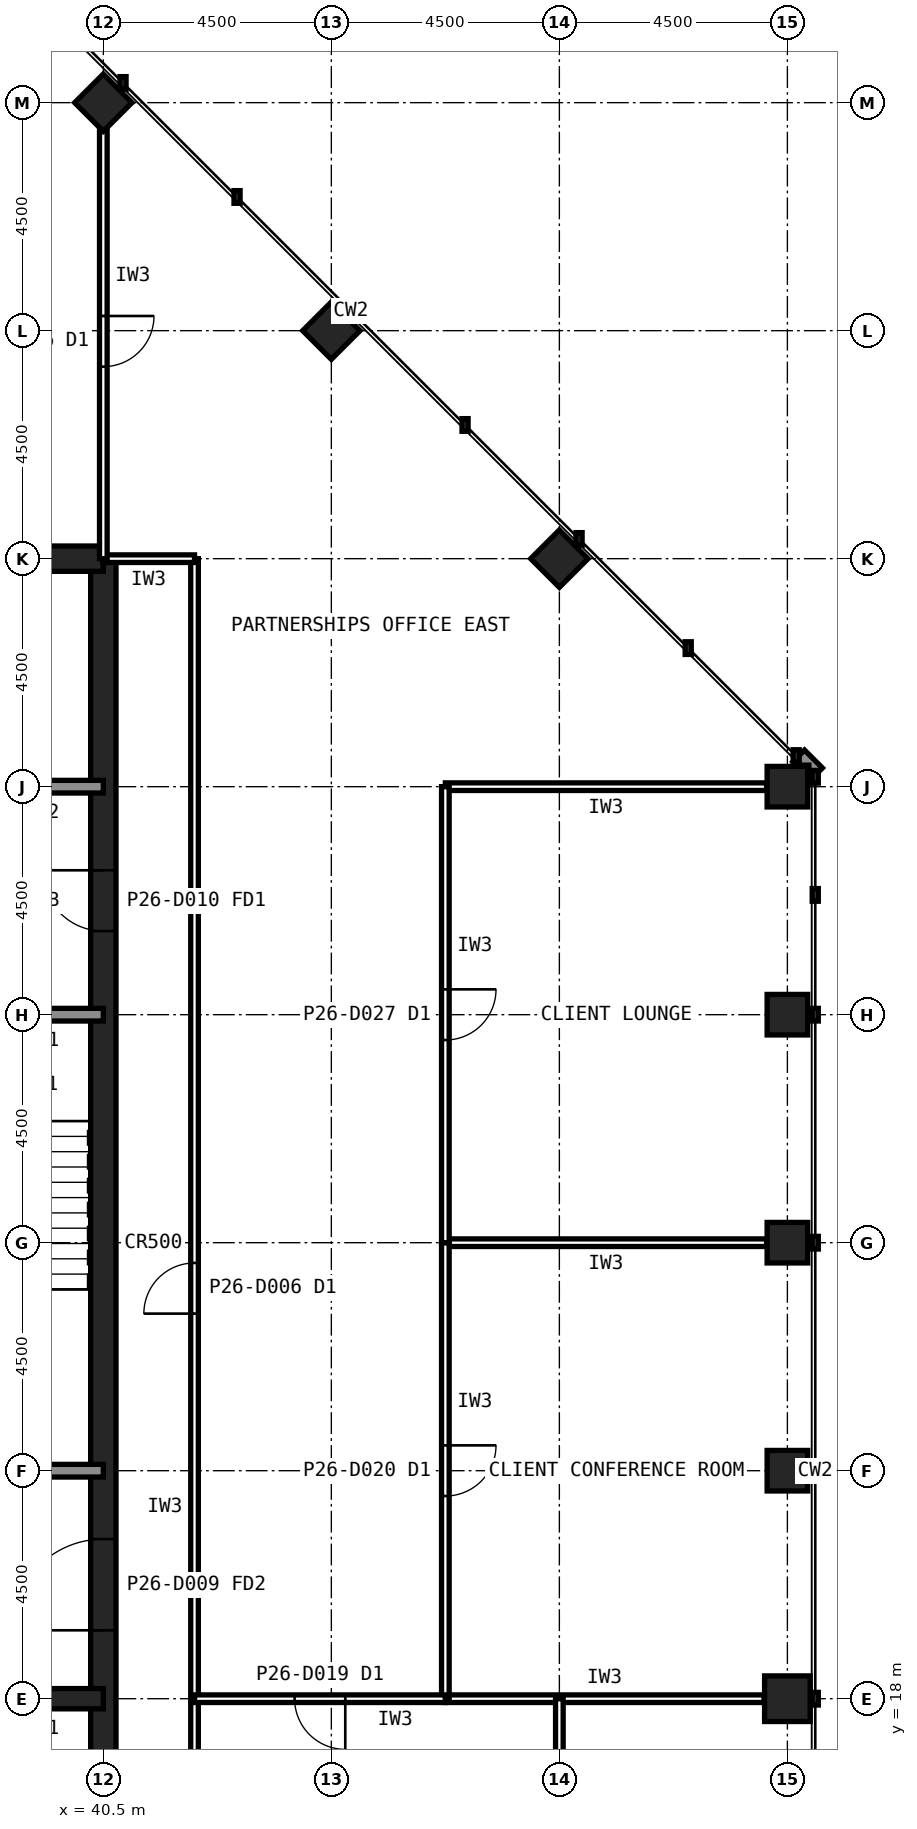
"""IFC4 building model, lengths in metres.
Left out: names, types, materials, properties, quantities, classifications, styles, units other than length and angle.
Written with IfcOpenShell. Run it as: python <this file> out.ifc"""

import sys

from ifc_helpers import new_model, si_unit, direction, frame, frame_2d, origin, origin_2d, place, context, subcontext, project, spatial, rectangle, hollow_rectangle, extrude, element, fill, save


model = new_model("IFC4")
c1 = context("Model", 3, precision=1e-05, world=origin(), true_north=direction((0.0, 1.0)))
c2 = subcontext(c1, "Body", "Model", "MODEL_VIEW")
j1 = project(units=[si_unit("LENGTHUNIT", "METRE"), si_unit("PLANEANGLEUNIT", "RADIAN")], contexts=[c1])
p1 = place(None, origin())
s1 = spatial("IfcSite", under=j1, at=p1, CompositionType="ELEMENT")
p2 = place(p1, origin())
s2 = spatial("IfcBuilding", under=s1, at=p2, CompositionType="ELEMENT")
p3 = place(p2, frame((0.0, 0.0, 115.6)))
s3 = spatial("IfcBuildingStorey", under=s2, at=p3, CompositionType="ELEMENT", Elevation=115.6)
p4 = place(p3, frame((54.0, 18.0, 0.0), z_axis=(0.0, 0.0, 1.0), x_axis=(1.0, 0.0, 0.0)))
e1 = element("IfcColumn", 1, at=p4, inside=s3, PredefinedType="COLUMN", context=c2, shape_type="SweptSolid", body=[
    extrude(hollow_rectangle(XDim=0.9, YDim=0.9, WallThickness=0.063, at=origin_2d()), origin(), (0.0, 0.0, 1.0), 4.0),
])
for number, where, z_axis, x_axis in (
    (2, (54.0, 22.5, 0.0), (0.0, 0.0, 1.0), (1.0, 0.0, 0.0)),
    (3, (54.0, 27.0, 0.0), (0.0, 0.0, 1.0), (1.0, 0.0, 0.0)),
    (4, (54.0, 31.5, 0.0), (0.0, 0.0, 1.0), (1.0, 0.0, 0.0)),
    (5, (54.0, 36.0, 0.0), (0.0, 0.0, 1.0), (1.0, 0.0, 0.0)),
    (6, (49.5, 40.5, 0.0), (0.0, 0.0, 1.0), (0.707, 0.707, 0.0)),
    (7, (45.0, 45.0, 0.0), (0.0, 0.0, 1.0), (0.707, 0.707, 0.0)),
    (8, (40.5, 49.5, 0.0), (0.0, 0.0, 1.0), (0.707, 0.707, 0.0)),
):
    element("IfcColumn", number, at=place(p3, frame(where, z_axis=z_axis, x_axis=x_axis)), inside=s3, PredefinedType="COLUMN", context=c2, shape_type="SweptSolid", body=[
        extrude(hollow_rectangle(XDim=0.8, YDim=0.8, WallThickness=0.045, at=origin_2d()), origin(), (0.0, 0.0, 1.0), 4.0),
    ])
p5 = place(p3, frame((40.5, 13.5, 0.0), z_axis=(0.0, 0.0, 1.0), x_axis=(0.0, 1.0, 0.0)))
e9 = element("IfcWall", 9, at=p5, inside=s3, PredefinedType="SHEAR", context=c2, shape_type="SweptSolid", body=[
    extrude(rectangle(XDim=27.0, YDim=0.5, at=frame_2d((13.5, 0.0))), origin(), (0.0, 0.0, 1.0), 4.0),
])
p6 = place(p5, frame((5.85, 0.0, 0.0)))
e10 = element("IfcOpeningElement", 10, at=p6, cuts=e9, PredefinedType="OPENING", context=c2, shape_type="SweptSolid", body=[
    extrude(rectangle(XDim=1.8, YDim=2.1, at=frame_2d((0.9, 1.05))), frame((0.0, 0.26, 0.0), z_axis=(0.0, -1.0, 0.0), x_axis=(1.0, 0.0, 0.0)), (0.0, 0.0, 1.0), 0.52),
])
p7 = place(p5, frame((19.65, 0.0, 0.0)))
e11 = element("IfcOpeningElement", 11, at=p7, cuts=e9, PredefinedType="OPENING", context=c2, shape_type="SweptSolid", body=[
    extrude(rectangle(XDim=1.2, YDim=2.1, at=frame_2d((0.6, 1.05))), frame((0.0, 0.26, 0.0), z_axis=(0.0, -1.0, 0.0), x_axis=(1.0, 0.0, 0.0)), (0.0, 0.0, 1.0), 0.52),
])
p8 = place(p3, frame((40.5, 40.5, 0.0), z_axis=(0.0, 0.0, 1.0), x_axis=(-1.0, 0.0, 0.0)))
e12 = element("IfcWall", 12, at=p8, inside=s3, PredefinedType="SHEAR", context=c2, shape_type="SweptSolid", body=[
    extrude(rectangle(XDim=27.0, YDim=0.5, at=frame_2d((13.5, 0.0))), origin(), (0.0, 0.0, 1.0), 4.0),
])
p9 = place(p3, frame((13.5, 18.0, 0.0), z_axis=(0.0, 0.0, 1.0), x_axis=(1.0, 0.0, 0.0)))
e13 = element("IfcWall", 13, at=p9, inside=s3, PredefinedType="SHEAR", context=c2, shape_type="SweptSolid", body=[
    extrude(rectangle(XDim=27.0, YDim=0.4, at=frame_2d((13.5, 0.0))), origin(), (0.0, 0.0, 1.0), 4.0),
])
p10 = place(p9, frame((24.3, 0.0, 0.0)))
e14 = element("IfcOpeningElement", 14, at=p10, cuts=e13, PredefinedType="OPENING", context=c2, shape_type="SweptSolid", body=[
    extrude(rectangle(XDim=0.9, YDim=2.1, at=frame_2d((0.45, 1.05))), frame((0.0, 0.21, 0.0), z_axis=(0.0, -1.0, 0.0), x_axis=(1.0, 0.0, 0.0)), (0.0, 0.0, 1.0), 0.42),
])
p11 = place(p9, frame((5.45, 0.0, 0.0)))
e15 = element("IfcOpeningElement", 15, at=p11, cuts=e13, PredefinedType="OPENING", context=c2, shape_type="SweptSolid", body=[
    extrude(rectangle(XDim=1.1, YDim=2.1, at=frame_2d((0.55, 1.05))), frame((0.0, 0.21, 0.0), z_axis=(0.0, -1.0, 0.0), x_axis=(1.0, 0.0, 0.0)), (0.0, 0.0, 1.0), 0.42),
])
p12 = place(p9, frame((8.45, 0.0, 0.0)))
e16 = element("IfcOpeningElement", 16, at=p12, cuts=e13, PredefinedType="OPENING", context=c2, shape_type="SweptSolid", body=[
    extrude(rectangle(XDim=1.1, YDim=2.1, at=frame_2d((0.55, 1.05))), frame((0.0, 0.21, 0.0), z_axis=(0.0, -1.0, 0.0), x_axis=(1.0, 0.0, 0.0)), (0.0, 0.0, 1.0), 0.42),
])
p13 = place(p9, frame((11.45, 0.0, 0.0)))
e17 = element("IfcOpeningElement", 17, at=p13, cuts=e13, PredefinedType="OPENING", context=c2, shape_type="SweptSolid", body=[
    extrude(rectangle(XDim=1.1, YDim=2.1, at=frame_2d((0.55, 1.05))), frame((0.0, 0.21, 0.0), z_axis=(0.0, -1.0, 0.0), x_axis=(1.0, 0.0, 0.0)), (0.0, 0.0, 1.0), 0.42),
])
p14 = place(p9, frame((14.45, 0.0, 0.0)))
e18 = element("IfcOpeningElement", 18, at=p14, cuts=e13, PredefinedType="OPENING", context=c2, shape_type="SweptSolid", body=[
    extrude(rectangle(XDim=1.1, YDim=2.1, at=frame_2d((0.55, 1.05))), frame((0.0, 0.21, 0.0), z_axis=(0.0, -1.0, 0.0), x_axis=(1.0, 0.0, 0.0)), (0.0, 0.0, 1.0), 0.42),
])
p15 = place(p9, frame((17.45, 0.0, 0.0)))
e19 = element("IfcOpeningElement", 19, at=p15, cuts=e13, PredefinedType="OPENING", context=c2, shape_type="SweptSolid", body=[
    extrude(rectangle(XDim=1.1, YDim=2.1, at=frame_2d((0.55, 1.05))), frame((0.0, 0.21, 0.0), z_axis=(0.0, -1.0, 0.0), x_axis=(1.0, 0.0, 0.0)), (0.0, 0.0, 1.0), 0.42),
])
p16 = place(p9, frame((20.45, 0.0, 0.0)))
e20 = element("IfcOpeningElement", 20, at=p16, cuts=e13, PredefinedType="OPENING", context=c2, shape_type="SweptSolid", body=[
    extrude(rectangle(XDim=1.1, YDim=2.1, at=frame_2d((0.55, 1.05))), frame((0.0, 0.21, 0.0), z_axis=(0.0, -1.0, 0.0), x_axis=(1.0, 0.0, 0.0)), (0.0, 0.0, 1.0), 0.42),
])
p17 = place(p9, frame((1.6, 0.0, 0.0)))
e21 = element("IfcOpeningElement", 21, at=p17, cuts=e13, PredefinedType="OPENING", context=c2, shape_type="SweptSolid", body=[
    extrude(rectangle(XDim=1.3, YDim=2.2, at=frame_2d((0.65, 1.1))), frame((0.0, 0.21, 0.0), z_axis=(0.0, -1.0, 0.0), x_axis=(1.0, 0.0, 0.0)), (0.0, 0.0, 1.0), 0.42),
])
p18 = place(p3, frame((13.5, 36.0, 0.0), z_axis=(0.0, 0.0, 1.0), x_axis=(1.0, 0.0, 0.0)))
e22 = element("IfcWall", 22, at=p18, inside=s3, PredefinedType="SOLIDWALL", context=c2, shape_type="SweptSolid", body=[
    extrude(rectangle(XDim=27.0, YDim=0.25, at=frame_2d((13.5, 0.0))), origin(), (0.0, 0.0, 1.0), 3.84),
])
p19 = place(p18, frame((1.8, 0.0, 0.0)))
e23 = element("IfcOpeningElement", 23, at=p19, cuts=e22, PredefinedType="OPENING", context=c2, shape_type="SweptSolid", body=[
    extrude(rectangle(XDim=0.9, YDim=2.1, at=frame_2d((0.45, 1.05))), frame((0.0, 0.135, 0.0), z_axis=(0.0, -1.0, 0.0), x_axis=(1.0, 0.0, 0.0)), (0.0, 0.0, 1.0), 0.27),
])
p20 = place(p18, frame((24.1, 0.0, 0.0)))
e24 = element("IfcOpeningElement", 24, at=p20, cuts=e22, PredefinedType="OPENING", context=c2, shape_type="SweptSolid", body=[
    extrude(rectangle(XDim=1.3, YDim=2.2, at=frame_2d((0.65, 1.1))), frame((0.0, 0.135, 0.0), z_axis=(0.0, -1.0, 0.0), x_axis=(1.0, 0.0, 0.0)), (0.0, 0.0, 1.0), 0.27),
])
p21 = place(p3, frame((13.5, 22.5, 0.0), z_axis=(0.0, 0.0, 1.0), x_axis=(1.0, 0.0, 0.0)))
e25 = element("IfcWall", 25, at=p21, inside=s3, PredefinedType="SOLIDWALL", context=c2, shape_type="SweptSolid", body=[
    extrude(rectangle(XDim=27.0, YDim=0.25, at=frame_2d((13.5, 0.0))), origin(), (0.0, 0.0, 1.0), 3.84),
])
p22 = place(p21, frame((1.65, 0.0, 0.0)))
e26 = element("IfcOpeningElement", 26, at=p22, cuts=e25, PredefinedType="OPENING", context=c2, shape_type="SweptSolid", body=[
    extrude(rectangle(XDim=1.2, YDim=2.1, at=frame_2d((0.6, 1.05))), frame((0.0, 0.135, 0.0), z_axis=(0.0, -1.0, 0.0), x_axis=(1.0, 0.0, 0.0)), (0.0, 0.0, 1.0), 0.27),
])
p23 = place(p21, frame((6.025, 0.0, 0.0)))
e27 = element("IfcOpeningElement", 27, at=p23, cuts=e25, PredefinedType="OPENING", context=c2, shape_type="SweptSolid", body=[
    extrude(rectangle(XDim=1.0, YDim=2.1, at=frame_2d((0.5, 1.05))), frame((0.0, 0.135, 0.0), z_axis=(0.0, -1.0, 0.0), x_axis=(1.0, 0.0, 0.0)), (0.0, 0.0, 1.0), 0.27),
])
p24 = place(p21, frame((10.525, 0.0, 0.0)))
e28 = element("IfcOpeningElement", 28, at=p24, cuts=e25, PredefinedType="OPENING", context=c2, shape_type="SweptSolid", body=[
    extrude(rectangle(XDim=1.0, YDim=2.1, at=frame_2d((0.5, 1.05))), frame((0.0, 0.135, 0.0), z_axis=(0.0, -1.0, 0.0), x_axis=(1.0, 0.0, 0.0)), (0.0, 0.0, 1.0), 0.27),
])
p25 = place(p21, frame((19.75, 0.0, 0.0)))
e29 = element("IfcOpeningElement", 29, at=p25, cuts=e25, PredefinedType="OPENING", context=c2, shape_type="SweptSolid", body=[
    extrude(rectangle(XDim=1.0, YDim=2.1, at=frame_2d((0.5, 1.05))), frame((0.0, 0.135, 0.0), z_axis=(0.0, -1.0, 0.0), x_axis=(1.0, 0.0, 0.0)), (0.0, 0.0, 1.0), 0.27),
])
p26 = place(p21, frame((15.05, 0.0, 0.0)))
e30 = element("IfcOpeningElement", 30, at=p26, cuts=e25, PredefinedType="OPENING", context=c2, shape_type="SweptSolid", body=[
    extrude(rectangle(XDim=1.4, YDim=2.4, at=frame_2d((0.7, 1.2))), frame((0.0, 0.135, 0.0), z_axis=(0.0, -1.0, 0.0), x_axis=(1.0, 0.0, 0.0)), (0.0, 0.0, 1.0), 0.27),
])
p27 = place(p3, frame((13.5, 31.5, 0.0), z_axis=(0.0, 0.0, 1.0), x_axis=(1.0, 0.0, 0.0)))
e31 = element("IfcWall", 31, at=p27, inside=s3, PredefinedType="SOLIDWALL", context=c2, shape_type="SweptSolid", body=[
    extrude(rectangle(XDim=27.0, YDim=0.25, at=frame_2d((13.5, 0.0))), origin(), (0.0, 0.0, 1.0), 3.84),
])
p28 = place(p27, frame((24.15, 0.0, 0.0)))
e32 = element("IfcOpeningElement", 32, at=p28, cuts=e31, PredefinedType="OPENING", context=c2, shape_type="SweptSolid", body=[
    extrude(rectangle(XDim=1.2, YDim=2.1, at=frame_2d((0.6, 1.05))), frame((0.0, 0.135, 0.0), z_axis=(0.0, -1.0, 0.0), x_axis=(1.0, 0.0, 0.0)), (0.0, 0.0, 1.0), 0.27),
])
p29 = place(p27, frame((15.3, 0.0, 0.0)))
e33 = element("IfcOpeningElement", 33, at=p29, cuts=e31, PredefinedType="OPENING", context=c2, shape_type="SweptSolid", body=[
    extrude(rectangle(XDim=0.9, YDim=2.1, at=frame_2d((0.45, 1.05))), frame((0.0, 0.135, 0.0), z_axis=(0.0, -1.0, 0.0), x_axis=(1.0, 0.0, 0.0)), (0.0, 0.0, 1.0), 0.27),
])
p30 = place(p27, frame((19.8, 0.0, 0.0)))
e34 = element("IfcOpeningElement", 34, at=p30, cuts=e31, PredefinedType="OPENING", context=c2, shape_type="SweptSolid", body=[
    extrude(rectangle(XDim=0.9, YDim=2.1, at=frame_2d((0.45, 1.05))), frame((0.0, 0.135, 0.0), z_axis=(0.0, -1.0, 0.0), x_axis=(1.0, 0.0, 0.0)), (0.0, 0.0, 1.0), 0.27),
])
p31 = place(p3, frame((42.3, 11.7, 0.0), z_axis=(0.0, 0.0, 1.0), x_axis=(0.0, 1.0, 0.0)))
e35 = element("IfcWall", 35, at=p31, inside=s3, PredefinedType="PARTITIONING", context=c2, shape_type="SweptSolid", body=[
    extrude(rectangle(XDim=28.8, YDim=0.15, at=frame_2d((14.4, 0.0))), origin(), (0.0, 0.0, 1.0), 3.84),
])
p32 = place(p31, frame((13.9, 0.0, 0.0)))
e36 = element("IfcOpeningElement", 36, at=p32, cuts=e35, PredefinedType="OPENING", context=c2, shape_type="SweptSolid", body=[
    extrude(rectangle(XDim=1.0, YDim=2.1, at=frame_2d((0.5, 1.05))), frame((0.0, 0.085, 0.0), z_axis=(0.0, -1.0, 0.0), x_axis=(1.0, 0.0, 0.0)), (0.0, 0.0, 1.0), 0.17),
])
p33 = place(p3, frame((42.3, 40.5, 0.0), z_axis=(0.0, 0.0, 1.0), x_axis=(-1.0, 0.0, 0.0)))
e37 = element("IfcWall", 37, at=p33, inside=s3, PredefinedType="PARTITIONING", context=c2, shape_type="SweptSolid", body=[
    extrude(rectangle(XDim=1.81, YDim=0.15, at=frame_2d((0.905, 0.0))), origin(), (0.0, 0.0, 1.0), 2.989),
])
p34 = place(p3, frame((47.25, 18.0, 0.0), z_axis=(0.0, 0.0, 1.0), x_axis=(1.0, 0.0, 0.0)))
e38 = element("IfcWall", 38, at=p34, inside=s3, PredefinedType="PARTITIONING", context=c2, shape_type="SweptSolid", body=[
    extrude(rectangle(XDim=6.29, YDim=0.15, at=frame_2d((3.145, 0.0))), origin(), (0.0, 0.0, 1.0), 2.989),
])
p35 = place(p3, frame((53.59, 27.0, 0.0), z_axis=(0.0, 0.0, 1.0), x_axis=(-1.0, 0.0, 0.0)))
e39 = element("IfcWall", 39, at=p35, inside=s3, PredefinedType="PARTITIONING", context=c2, shape_type="SweptSolid", body=[
    extrude(rectangle(XDim=6.34, YDim=0.15, at=frame_2d((3.17, 0.0))), origin(), (0.0, 0.0, 1.0), 2.989),
])
p36 = place(p3, frame((47.25, 27.0, 0.0), z_axis=(0.0, 0.0, 1.0), x_axis=(0.0, -1.0, 0.0)))
e40 = element("IfcWall", 40, at=p36, inside=s3, PredefinedType="PARTITIONING", context=c2, shape_type="SweptSolid", body=[
    extrude(rectangle(XDim=9.0, YDim=0.15, at=frame_2d((4.5, 0.0))), origin(), (0.0, 0.0, 1.0), 3.84),
])
p37 = place(p36, frame((4.0, 0.0, 0.0)))
e41 = element("IfcOpeningElement", 41, at=p37, cuts=e40, PredefinedType="OPENING", context=c2, shape_type="SweptSolid", body=[
    extrude(rectangle(XDim=1.0, YDim=2.1, at=frame_2d((0.5, 1.05))), frame((0.0, 0.085, 0.0), z_axis=(0.0, -1.0, 0.0), x_axis=(1.0, 0.0, 0.0)), (0.0, 0.0, 1.0), 0.17),
])
p38 = place(p3, frame((53.59, 36.0, 0.0), z_axis=(0.0, 0.0, 1.0), x_axis=(-1.0, 0.0, 0.0)))
e42 = element("IfcWall", 42, at=p38, inside=s3, PredefinedType="PARTITIONING", context=c2, shape_type="SweptSolid", body=[
    extrude(rectangle(XDim=6.34, YDim=0.15, at=frame_2d((3.17, 0.0))), origin(), (0.0, 0.0, 1.0), 2.989),
])
p39 = place(p3, frame((47.25, 36.0, 0.0), z_axis=(0.0, 0.0, 1.0), x_axis=(0.0, -1.0, 0.0)))
e43 = element("IfcWall", 43, at=p39, inside=s3, PredefinedType="PARTITIONING", context=c2, shape_type="SweptSolid", body=[
    extrude(rectangle(XDim=9.0, YDim=0.15, at=frame_2d((4.5, 0.0))), origin(), (0.0, 0.0, 1.0), 3.84),
])
p40 = place(p39, frame((4.0, 0.0, 0.0)))
e44 = element("IfcOpeningElement", 44, at=p40, cuts=e43, PredefinedType="OPENING", context=c2, shape_type="SweptSolid", body=[
    extrude(rectangle(XDim=1.0, YDim=2.1, at=frame_2d((0.5, 1.05))), frame((0.0, 0.085, 0.0), z_axis=(0.0, -1.0, 0.0), x_axis=(1.0, 0.0, 0.0)), (0.0, 0.0, 1.0), 0.17),
])
p41 = place(p3, frame((49.5, 18.0, 0.0), z_axis=(0.0, 0.0, 1.0), x_axis=(0.0, -1.0, 0.0)))
e45 = element("IfcWall", 45, at=p41, inside=s3, PredefinedType="PARTITIONING", context=c2, shape_type="SweptSolid", body=[
    extrude(rectangle(XDim=9.0, YDim=0.15, at=frame_2d((4.5, 0.0))), origin(), (0.0, 0.0, 1.0), 3.84),
])
p42 = place(p41, frame((4.0, 0.0, 0.0)))
e46 = element("IfcOpeningElement", 46, at=p42, cuts=e45, PredefinedType="OPENING", context=c2, shape_type="SweptSolid", body=[
    extrude(rectangle(XDim=1.0, YDim=2.1, at=frame_2d((0.5, 1.05))), frame((0.0, 0.085, 0.0), z_axis=(0.0, -1.0, 0.0), x_axis=(1.0, 0.0, 0.0)), (0.0, 0.0, 1.0), 0.17),
])
p43 = place(p3, frame((40.5, 49.08, 0.0), z_axis=(0.0, 0.0, 1.0), x_axis=(0.0, -1.0, 0.0)))
e47 = element("IfcWall", 47, at=p43, inside=s3, PredefinedType="PARTITIONING", context=c2, shape_type="SweptSolid", body=[
    extrude(rectangle(XDim=8.58, YDim=0.15, at=frame_2d((4.29, 0.0))), origin(), (0.0, 0.0, 1.0), 2.989),
])
p44 = place(p43, frame((3.79, 0.0, 0.0)))
e48 = element("IfcOpeningElement", 48, at=p44, cuts=e47, PredefinedType="OPENING", context=c2, shape_type="SweptSolid", body=[
    extrude(rectangle(XDim=1.0, YDim=2.1, at=frame_2d((0.5, 1.05))), frame((0.0, 0.085, 0.0), z_axis=(0.0, -1.0, 0.0), x_axis=(1.0, 0.0, 0.0)), (0.0, 0.0, 1.0), 0.17),
])
p45 = place(p3, frame((47.25, 18.0, 0.0), z_axis=(0.0, 0.0, 1.0), x_axis=(-1.0, 0.0, 0.0)))
e49 = element("IfcWall", 49, at=p45, inside=s3, PredefinedType="PARTITIONING", context=c2, shape_type="SweptSolid", body=[
    extrude(rectangle(XDim=4.95, YDim=0.15, at=frame_2d((2.475, 0.0))), origin(), (0.0, 0.0, 1.0), 2.989),
])
p46 = place(p45, frame((1.975, 0.0, 0.0)))
e50 = element("IfcOpeningElement", 50, at=p46, cuts=e49, PredefinedType="OPENING", context=c2, shape_type="SweptSolid", body=[
    extrude(rectangle(XDim=1.0, YDim=2.1, at=frame_2d((0.5, 1.05))), frame((0.0, 0.085, 0.0), z_axis=(0.0, -1.0, 0.0), x_axis=(1.0, 0.0, 0.0)), (0.0, 0.0, 1.0), 0.17),
])
p47 = place(p6, origin())
e51 = element("IfcDoor", 51, at=p47, inside=s3, OperationType="SINGLE_SWING_LEFT", PredefinedType="DOOR", context=c2, shape_type="SweptSolid", body=[
    extrude(rectangle(XDim=1.8, YDim=2.1, at=frame_2d((0.9, 1.05))), frame((0.0, 0.025, 0.0), z_axis=(0.0, -1.0, 0.0), x_axis=(1.0, 0.0, 0.0)), (0.0, 0.0, 1.0), 0.05),
])
fill(e10, e51)
p48 = place(p7, origin())
e52 = element("IfcDoor", 52, at=p48, inside=s3, OperationType="SINGLE_SWING_RIGHT", PredefinedType="DOOR", context=c2, shape_type="SweptSolid", body=[
    extrude(rectangle(XDim=1.2, YDim=2.1, at=frame_2d((0.6, 1.05))), frame((0.0, 0.025, 0.0), z_axis=(0.0, -1.0, 0.0), x_axis=(1.0, 0.0, 0.0)), (0.0, 0.0, 1.0), 0.05),
])
fill(e11, e52)
p49 = place(p32, origin())
e53 = element("IfcDoor", 53, at=p49, inside=s3, OperationType="SINGLE_SWING_LEFT", PredefinedType="DOOR", context=c2, shape_type="SweptSolid", body=[
    extrude(rectangle(XDim=1.0, YDim=2.1, at=frame_2d((0.5, 1.05))), frame((0.0, 0.025, 0.0), z_axis=(0.0, -1.0, 0.0), x_axis=(1.0, 0.0, 0.0)), (0.0, 0.0, 1.0), 0.05),
])
fill(e36, e53)
p50 = place(p37, origin())
e54 = element("IfcDoor", 54, at=p50, inside=s3, OperationType="SINGLE_SWING_LEFT", PredefinedType="DOOR", context=c2, shape_type="SweptSolid", body=[
    extrude(rectangle(XDim=1.0, YDim=2.1, at=frame_2d((0.5, 1.05))), frame((0.0, 0.025, 0.0), z_axis=(0.0, -1.0, 0.0), x_axis=(1.0, 0.0, 0.0)), (0.0, 0.0, 1.0), 0.05),
])
fill(e41, e54)
p51 = place(p40, origin())
e55 = element("IfcDoor", 55, at=p51, inside=s3, OperationType="SINGLE_SWING_LEFT", PredefinedType="DOOR", context=c2, shape_type="SweptSolid", body=[
    extrude(rectangle(XDim=1.0, YDim=2.1, at=frame_2d((0.5, 1.05))), frame((0.0, 0.025, 0.0), z_axis=(0.0, -1.0, 0.0), x_axis=(1.0, 0.0, 0.0)), (0.0, 0.0, 1.0), 0.05),
])
fill(e44, e55)
p52 = place(p44, origin())
e56 = element("IfcDoor", 56, at=p52, inside=s3, OperationType="SINGLE_SWING_LEFT", PredefinedType="DOOR", context=c2, shape_type="SweptSolid", body=[
    extrude(rectangle(XDim=1.0, YDim=2.1, at=frame_2d((0.5, 1.05))), frame((0.0, 0.025, 0.0), z_axis=(0.0, -1.0, 0.0), x_axis=(1.0, 0.0, 0.0)), (0.0, 0.0, 1.0), 0.05),
])
fill(e48, e56)
p53 = place(p46, origin())
e57 = element("IfcDoor", 57, at=p53, inside=s3, OperationType="SINGLE_SWING_LEFT", PredefinedType="DOOR", context=c2, shape_type="SweptSolid", body=[
    extrude(rectangle(XDim=1.0, YDim=2.1, at=frame_2d((0.5, 1.05))), frame((0.0, 0.025, 0.0), z_axis=(0.0, -1.0, 0.0), x_axis=(1.0, 0.0, 0.0)), (0.0, 0.0, 1.0), 0.05),
])
fill(e50, e57)
save(model, sys.argv[1])
